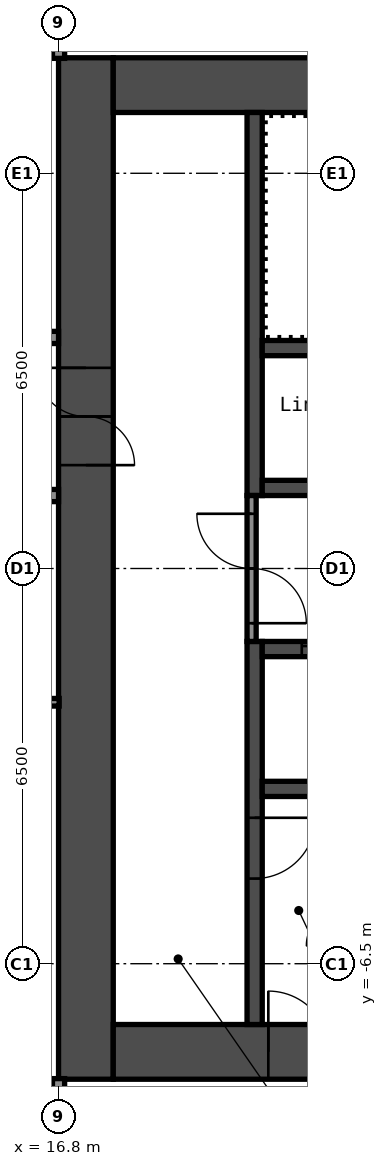
"""IFC4 building model, lengths in metres.
Left out: names, types, materials, properties, quantities, classifications, styles, units other than length and angle.
Written with IfcOpenShell. Run it as: python <this file> out.ifc"""

import sys

from ifc_helpers import new_model, si_unit, direction, frame, frame_2d, origin, place, context, subcontext, project, spatial, rectangle, extrude, element, fill, save


model = new_model("IFC4")
c1 = context("Model", 3, precision=1e-05, world=origin(), true_north=direction((0.0, 1.0)))
c2 = subcontext(c1, "Body", "Model", "MODEL_VIEW")
j1 = project(units=[si_unit("LENGTHUNIT", "METRE"), si_unit("PLANEANGLEUNIT", "RADIAN")], contexts=[c1])
p1 = place(None, origin())
s1 = spatial("IfcSite", under=j1, at=p1, CompositionType="ELEMENT")
p2 = place(p1, origin())
s2 = spatial("IfcBuilding", under=s1, at=p2, CompositionType="ELEMENT")
p3 = place(p2, frame((0.0, 0.0, 218.6)))
s3 = spatial("IfcBuildingStorey", under=s2, at=p3, CompositionType="ELEMENT", Elevation=218.6)
p4 = place(p3, frame((17.25, -8.4, 0.0), z_axis=(0.0, 0.0, 1.0), x_axis=(0.0, 1.0, 0.0)))
e1 = element("IfcWall", 1, at=p4, inside=s3, PredefinedType="SHEAR", context=c2, shape_type="SweptSolid", body=[
    extrude(rectangle(XDim=16.8, YDim=0.9, at=frame_2d((8.4, 0.0))), origin(), (0.0, 0.0, 1.0), 2.75),
])
p5 = place(p4, frame((10.1, 0.0, 0.0)))
e2 = element("IfcOpeningElement", 2, at=p5, cuts=e1, PredefinedType="OPENING", context=c2, shape_type="SweptSolid", body=[
    extrude(rectangle(XDim=1.6, YDim=2.1, at=frame_2d((0.8, 1.05))), frame((0.0, 0.46, 0.0), z_axis=(0.0, -1.0, 0.0), x_axis=(1.0, 0.0, 0.0)), (0.0, 0.0, 1.0), 0.92),
])
p6 = place(p3, frame((17.7, 7.95, 0.0), z_axis=(0.0, 0.0, 1.0), x_axis=(1.0, 0.0, 0.0)))
e3 = element("IfcWall", 3, at=p6, inside=s3, PredefinedType="SHEAR", context=c2, shape_type="SweptSolid", body=[
    extrude(rectangle(XDim=15.0, YDim=0.9, at=frame_2d((7.5, 0.0))), origin(), (0.0, 0.0, 1.0), 2.75),
])
p7 = place(p6, frame((10.4, 0.0, 0.0)))
e4 = element("IfcOpeningElement", 4, at=p7, cuts=e3, PredefinedType="OPENING", context=c2, shape_type="SweptSolid", body=[
    extrude(rectangle(XDim=1.2, YDim=2.1, at=frame_2d((0.6, 1.05))), frame((0.0, 0.46, 0.0), z_axis=(0.0, -1.0, 0.0), x_axis=(1.0, 0.0, 0.0)), (0.0, 0.0, 1.0), 0.92),
])
p8 = place(p6, frame((13.35, 0.0, 0.0)))
e5 = element("IfcOpeningElement", 5, at=p8, cuts=e3, PredefinedType="OPENING", context=c2, shape_type="SweptSolid", body=[
    extrude(rectangle(XDim=0.9, YDim=2.1, at=frame_2d((0.45, 1.05))), frame((0.0, 0.46, 0.0), z_axis=(0.0, -1.0, 0.0), x_axis=(1.0, 0.0, 0.0)), (0.0, 0.0, 1.0), 0.92),
])
p9 = place(p3, frame((17.7, -7.95, 0.0), z_axis=(0.0, 0.0, 1.0), x_axis=(1.0, 0.0, 0.0)))
e6 = element("IfcWall", 6, at=p9, inside=s3, PredefinedType="SHEAR", context=c2, shape_type="SweptSolid", body=[
    extrude(rectangle(XDim=15.0, YDim=0.9, at=frame_2d((7.5, 0.0))), origin(), (0.0, 0.0, 1.0), 2.75),
])
p10 = place(p9, frame((2.55, 0.0, 0.0)))
e7 = element("IfcOpeningElement", 7, at=p10, cuts=e6, PredefinedType="OPENING", context=c2, shape_type="SweptSolid", body=[
    extrude(rectangle(XDim=1.0, YDim=2.1, at=frame_2d((0.5, 1.05))), frame((0.0, 0.46, 0.0), z_axis=(0.0, -1.0, 0.0), x_axis=(1.0, 0.0, 0.0)), (0.0, 0.0, 1.0), 0.92),
])
p11 = place(p3, frame((20.025, 1.2, 0.0), z_axis=(0.0, 0.0, 1.0), x_axis=(0.0, 1.0, 0.0)))
e8 = element("IfcWall", 8, at=p11, inside=s3, PredefinedType="SHEAR", context=c2, shape_type="SweptSolid", body=[
    extrude(rectangle(XDim=6.3, YDim=0.25, at=frame_2d((3.15, 0.0))), origin(), (0.0, 0.0, 1.0), 2.75),
])
p12 = place(p3, frame((20.025, -7.5, 0.0), z_axis=(0.0, 0.0, 1.0), x_axis=(0.0, 1.0, 0.0)))
e9 = element("IfcWall", 9, at=p12, inside=s3, PredefinedType="SHEAR", context=c2, shape_type="SweptSolid", body=[
    extrude(rectangle(XDim=6.3, YDim=0.25, at=frame_2d((3.15, 0.0))), origin(), (0.0, 0.0, 1.0), 2.75),
])
p13 = place(p12, frame((2.4, 0.0, 0.0)))
e10 = element("IfcOpeningElement", 10, at=p13, cuts=e9, PredefinedType="OPENING", context=c2, shape_type="SweptSolid", body=[
    extrude(rectangle(XDim=1.0, YDim=2.1, at=frame_2d((0.5, 1.05))), frame((0.0, 0.135, 0.0), z_axis=(0.0, -1.0, 0.0), x_axis=(1.0, 0.0, 0.0)), (0.0, 0.0, 1.0), 0.27),
])
p14 = place(p3, frame((20.15, 1.325, 0.0), z_axis=(0.0, 0.0, 1.0), x_axis=(1.0, 0.0, 0.0)))
e11 = element("IfcWall", 11, at=p14, inside=s3, PredefinedType="SHEAR", context=c2, shape_type="SweptSolid", body=[
    extrude(rectangle(XDim=7.5, YDim=0.25, at=frame_2d((3.75, 0.0))), origin(), (0.0, 0.0, 1.0), 2.75),
])
p15 = place(p14, frame((1.837, 0.0, 0.0)))
e12 = element("IfcOpeningElement", 12, at=p15, cuts=e11, PredefinedType="OPENING", context=c2, shape_type="SweptSolid", body=[
    extrude(rectangle(XDim=0.9, YDim=2.1, at=frame_2d((0.45, 1.05))), frame((0.0, 0.135, 0.0), z_axis=(0.0, -1.0, 0.0), x_axis=(1.0, 0.0, 0.0)), (0.0, 0.0, 1.0), 0.27),
])
p16 = place(p14, frame((5.538, 0.0, 0.0)))
e13 = element("IfcOpeningElement", 13, at=p16, cuts=e11, PredefinedType="OPENING", context=c2, shape_type="SweptSolid", body=[
    extrude(rectangle(XDim=0.9, YDim=2.1, at=frame_2d((0.45, 1.05))), frame((0.0, 0.135, 0.0), z_axis=(0.0, -1.0, 0.0), x_axis=(1.0, 0.0, 0.0)), (0.0, 0.0, 1.0), 0.27),
])
p17 = place(p3, frame((20.15, 3.625, 0.0), z_axis=(0.0, 0.0, 1.0), x_axis=(1.0, 0.0, 0.0)))
e14 = element("IfcWall", 14, at=p17, inside=s3, PredefinedType="SHEAR", context=c2, shape_type="SweptSolid", body=[
    extrude(rectangle(XDim=7.5, YDim=0.25, at=frame_2d((3.75, 0.0))), origin(), (0.0, 0.0, 1.0), 2.75),
])
p18 = place(p3, frame((20.15, -1.325, 0.0), z_axis=(0.0, 0.0, 1.0), x_axis=(1.0, 0.0, 0.0)))
e15 = element("IfcWall", 15, at=p18, inside=s3, PredefinedType="SHEAR", context=c2, shape_type="SweptSolid", body=[
    extrude(rectangle(XDim=7.5, YDim=0.25, at=frame_2d((3.75, 0.0))), origin(), (0.0, 0.0, 1.0), 2.75),
])
p19 = place(p18, frame((0.65, 0.0, 0.0)))
e16 = element("IfcOpeningElement", 16, at=p19, cuts=e15, PredefinedType="OPENING", context=c2, shape_type="SweptSolid", body=[
    extrude(rectangle(XDim=1.1, YDim=2.1, at=frame_2d((0.55, 1.05))), frame((0.0, 0.135, 0.0), z_axis=(0.0, -1.0, 0.0), x_axis=(1.0, 0.0, 0.0)), (0.0, 0.0, 1.0), 0.27),
])
p20 = place(p18, frame((3.05, 0.0, 0.0)))
e17 = element("IfcOpeningElement", 17, at=p20, cuts=e15, PredefinedType="OPENING", context=c2, shape_type="SweptSolid", body=[
    extrude(rectangle(XDim=1.1, YDim=2.1, at=frame_2d((0.55, 1.05))), frame((0.0, 0.135, 0.0), z_axis=(0.0, -1.0, 0.0), x_axis=(1.0, 0.0, 0.0)), (0.0, 0.0, 1.0), 0.27),
])
p21 = place(p18, frame((5.45, 0.0, 0.0)))
e18 = element("IfcOpeningElement", 18, at=p21, cuts=e15, PredefinedType="OPENING", context=c2, shape_type="SweptSolid", body=[
    extrude(rectangle(XDim=1.1, YDim=2.1, at=frame_2d((0.55, 1.05))), frame((0.0, 0.135, 0.0), z_axis=(0.0, -1.0, 0.0), x_axis=(1.0, 0.0, 0.0)), (0.0, 0.0, 1.0), 0.27),
])
p22 = place(p3, frame((20.15, -3.625, 0.0), z_axis=(0.0, 0.0, 1.0), x_axis=(1.0, 0.0, 0.0)))
e19 = element("IfcWall", 19, at=p22, inside=s3, PredefinedType="SHEAR", context=c2, shape_type="SweptSolid", body=[
    extrude(rectangle(XDim=7.5, YDim=0.25, at=frame_2d((3.75, 0.0))), origin(), (0.0, 0.0, 1.0), 2.75),
])
p23 = place(p3, frame((19.975, -1.2, 0.0), z_axis=(0.0, 0.0, 1.0), x_axis=(0.0, 1.0, 0.0)))
e20 = element("IfcWall", 20, at=p23, inside=s3, PredefinedType="PARTITIONING", context=c2, shape_type="SweptSolid", body=[
    extrude(rectangle(XDim=2.4, YDim=0.15, at=frame_2d((1.2, 0.0))), origin(), (0.0, 0.0, 1.0), 2.75),
])
p24 = place(p23, frame((0.3, 0.0, 0.0)))
e21 = element("IfcOpeningElement", 21, at=p24, cuts=e20, PredefinedType="OPENING", context=c2, shape_type="SweptSolid", body=[
    extrude(rectangle(XDim=1.8, YDim=2.1, at=frame_2d((0.9, 1.05))), frame((0.0, 0.085, 0.0), z_axis=(0.0, -1.0, 0.0), x_axis=(1.0, 0.0, 0.0)), (0.0, 0.0, 1.0), 0.17),
])
p25 = place(p3, frame((13.462, -2.2, 0.0), z_axis=(0.0, 0.0, 1.0), x_axis=(1.0, 0.0, 0.0)))
e22 = element("IfcWall", 22, at=p25, inside=s3, PredefinedType="PARTITIONING", context=c2, shape_type="SweptSolid", body=[
    extrude(rectangle(XDim=3.348, YDim=0.125, at=frame_2d((1.674, 0.0))), origin(), (0.0, 0.0, 1.0), 2.75),
])
p26 = place(p25, frame((1.238, 0.0, 0.0)))
e23 = element("IfcOpeningElement", 23, at=p26, cuts=e22, PredefinedType="OPENING", context=c2, shape_type="SweptSolid", body=[
    extrude(rectangle(XDim=0.8, YDim=2.1, at=frame_2d((0.4, 1.05))), frame((0.0, 0.073, 0.0), z_axis=(0.0, -1.0, 0.0), x_axis=(1.0, 0.0, 0.0)), (0.0, 0.0, 1.0), 0.145),
])
p27 = place(p3, frame((-16.8, 1.2, 0.0), z_axis=(0.0, 0.0, 1.0), x_axis=(1.0, 0.0, 0.0)))
e24 = element("IfcWall", 24, at=p27, inside=s3, PredefinedType="PARTITIONING", context=c2, shape_type="SweptSolid", body=[
    extrude(rectangle(XDim=33.6, YDim=0.2, at=frame_2d((16.8, 0.0))), origin(), (0.0, 0.0, 1.0), 2.75),
])
p28 = place(p27, frame((2.0, 0.0, 0.0)))
e25 = element("IfcOpeningElement", 25, at=p28, cuts=e24, PredefinedType="OPENING", context=c2, shape_type="SweptSolid", body=[
    extrude(rectangle(XDim=1.0, YDim=2.1, at=frame_2d((0.5, 1.05))), frame((0.0, 0.11, 0.0), z_axis=(0.0, -1.0, 0.0), x_axis=(1.0, 0.0, 0.0)), (0.0, 0.0, 1.0), 0.22),
])
p29 = place(p27, frame((12.1, 0.0, 0.0)))
e26 = element("IfcOpeningElement", 26, at=p29, cuts=e24, PredefinedType="OPENING", context=c2, shape_type="SweptSolid", body=[
    extrude(rectangle(XDim=1.0, YDim=2.1, at=frame_2d((0.5, 1.05))), frame((0.0, 0.11, 0.0), z_axis=(0.0, -1.0, 0.0), x_axis=(1.0, 0.0, 0.0)), (0.0, 0.0, 1.0), 0.22),
])
p30 = place(p27, frame((18.8, 0.0, 0.0)))
e27 = element("IfcOpeningElement", 27, at=p30, cuts=e24, PredefinedType="OPENING", context=c2, shape_type="SweptSolid", body=[
    extrude(rectangle(XDim=1.0, YDim=2.1, at=frame_2d((0.5, 1.05))), frame((0.0, 0.11, 0.0), z_axis=(0.0, -1.0, 0.0), x_axis=(1.0, 0.0, 0.0)), (0.0, 0.0, 1.0), 0.22),
])
p31 = place(p27, frame((27.2, 0.0, 0.0)))
e28 = element("IfcOpeningElement", 28, at=p31, cuts=e24, PredefinedType="OPENING", context=c2, shape_type="SweptSolid", body=[
    extrude(rectangle(XDim=1.0, YDim=2.1, at=frame_2d((0.5, 1.05))), frame((0.0, 0.11, 0.0), z_axis=(0.0, -1.0, 0.0), x_axis=(1.0, 0.0, 0.0)), (0.0, 0.0, 1.0), 0.22),
])
p32 = place(p3, frame((-16.8, 3.8, 0.0), z_axis=(0.0, 0.0, 1.0), x_axis=(1.0, 0.0, 0.0)))
e29 = element("IfcWall", 29, at=p32, inside=s3, PredefinedType="PARTITIONING", context=c2, shape_type="SweptSolid", body=[
    extrude(rectangle(XDim=33.6, YDim=0.2, at=frame_2d((16.8, 0.0))), origin(), (0.0, 0.0, 1.0), 2.75),
])
p33 = place(p32, frame((5.4, 0.0, 0.0)))
e30 = element("IfcOpeningElement", 30, at=p33, cuts=e29, PredefinedType="OPENING", context=c2, shape_type="SweptSolid", body=[
    extrude(rectangle(XDim=1.0, YDim=2.1, at=frame_2d((0.5, 1.05))), frame((0.0, 0.11, 0.0), z_axis=(0.0, -1.0, 0.0), x_axis=(1.0, 0.0, 0.0)), (0.0, 0.0, 1.0), 0.22),
])
p34 = place(p32, frame((12.1, 0.0, 0.0)))
e31 = element("IfcOpeningElement", 31, at=p34, cuts=e29, PredefinedType="OPENING", context=c2, shape_type="SweptSolid", body=[
    extrude(rectangle(XDim=1.0, YDim=2.1, at=frame_2d((0.5, 1.05))), frame((0.0, 0.11, 0.0), z_axis=(0.0, -1.0, 0.0), x_axis=(1.0, 0.0, 0.0)), (0.0, 0.0, 1.0), 0.22),
])
p35 = place(p32, frame((18.87, 0.0, 0.0)))
e32 = element("IfcOpeningElement", 32, at=p35, cuts=e29, PredefinedType="OPENING", context=c2, shape_type="SweptSolid", body=[
    extrude(rectangle(XDim=0.9, YDim=2.1, at=frame_2d((0.45, 1.05))), frame((0.0, 0.11, 0.0), z_axis=(0.0, -1.0, 0.0), x_axis=(1.0, 0.0, 0.0)), (0.0, 0.0, 1.0), 0.22),
])
p36 = place(p32, frame((23.07, 0.0, 0.0)))
e33 = element("IfcOpeningElement", 33, at=p36, cuts=e29, PredefinedType="OPENING", context=c2, shape_type="SweptSolid", body=[
    extrude(rectangle(XDim=0.9, YDim=2.1, at=frame_2d((0.45, 1.05))), frame((0.0, 0.11, 0.0), z_axis=(0.0, -1.0, 0.0), x_axis=(1.0, 0.0, 0.0)), (0.0, 0.0, 1.0), 0.22),
])
p37 = place(p32, frame((30.6, 0.0, 0.0)))
e34 = element("IfcOpeningElement", 34, at=p37, cuts=e29, PredefinedType="OPENING", context=c2, shape_type="SweptSolid", body=[
    extrude(rectangle(XDim=1.0, YDim=2.1, at=frame_2d((0.5, 1.05))), frame((0.0, 0.11, 0.0), z_axis=(0.0, -1.0, 0.0), x_axis=(1.0, 0.0, 0.0)), (0.0, 0.0, 1.0), 0.22),
])
p38 = place(p3, frame((16.8, -15.55, 0.0), z_axis=(0.0, 0.0, 1.0), x_axis=(0.0, 1.0, 0.0)))
e35 = element("IfcWall", 35, at=p38, inside=s3, PredefinedType="PARTITIONING", context=c2, shape_type="SweptSolid", body=[
    extrude(rectangle(XDim=7.16, YDim=0.2, at=frame_2d((3.58, 0.0))), origin(), (0.0, 0.0, 1.0), 2.75),
])
p39 = place(p3, frame((16.8, 8.39, 0.0), z_axis=(0.0, 0.0, 1.0), x_axis=(0.0, 1.0, 0.0)))
e36 = element("IfcWall", 36, at=p39, inside=s3, PredefinedType="PARTITIONING", context=c2, shape_type="SweptSolid", body=[
    extrude(rectangle(XDim=12.16, YDim=0.2, at=frame_2d((6.08, 0.0))), origin(), (0.0, 0.0, 1.0), 2.75),
])
p40 = place(p5, origin())
e37 = element("IfcDoor", 37, at=p40, inside=s3, OperationType="DOUBLE_DOOR_SINGLE_SWING", PredefinedType="DOOR", context=c2, shape_type="SweptSolid", body=[
    extrude(rectangle(XDim=1.6, YDim=2.1, at=frame_2d((0.8, 1.05))), frame((0.0, 0.025, 0.0), z_axis=(0.0, -1.0, 0.0), x_axis=(1.0, 0.0, 0.0)), (0.0, 0.0, 1.0), 0.05),
])
fill(e2, e37)
p41 = place(p10, origin())
e38 = element("IfcDoor", 38, at=p41, inside=s3, OperationType="SINGLE_SWING_RIGHT", PredefinedType="DOOR", context=c2, shape_type="SweptSolid", body=[
    extrude(rectangle(XDim=1.0, YDim=2.1, at=frame_2d((0.5, 1.05))), frame((0.0, 0.025, 0.0), z_axis=(0.0, -1.0, 0.0), x_axis=(1.0, 0.0, 0.0)), (0.0, 0.0, 1.0), 0.05),
])
fill(e7, e38)
p42 = place(p13, origin())
e39 = element("IfcDoor", 39, at=p42, inside=s3, OperationType="SINGLE_SWING_RIGHT", PredefinedType="DOOR", context=c2, shape_type="SweptSolid", body=[
    extrude(rectangle(XDim=1.0, YDim=2.1, at=frame_2d((0.5, 1.05))), frame((0.0, 0.025, 0.0), z_axis=(0.0, -1.0, 0.0), x_axis=(1.0, 0.0, 0.0)), (0.0, 0.0, 1.0), 0.05),
])
fill(e10, e39)
p43 = place(p24, origin())
e40 = element("IfcDoor", 40, at=p43, inside=s3, OperationType="DOUBLE_DOOR_SINGLE_SWING", PredefinedType="DOOR", context=c2, shape_type="SweptSolid", body=[
    extrude(rectangle(XDim=1.8, YDim=2.1, at=frame_2d((0.9, 1.05))), frame((0.0, 0.025, 0.0), z_axis=(0.0, -1.0, 0.0), x_axis=(1.0, 0.0, 0.0)), (0.0, 0.0, 1.0), 0.05),
])
fill(e21, e40)
p44 = place(p19, origin())
e41 = element("IfcDoor", 41, at=p44, inside=s3, OperationType="DOUBLE_DOOR_SLIDING", PredefinedType="DOOR", context=c2, shape_type="SweptSolid", body=[
    extrude(rectangle(XDim=1.1, YDim=2.1, at=frame_2d((0.55, 1.05))), frame((0.0, 0.025, 0.0), z_axis=(0.0, -1.0, 0.0), x_axis=(1.0, 0.0, 0.0)), (0.0, 0.0, 1.0), 0.05),
])
fill(e16, e41)
save(model, sys.argv[1])
